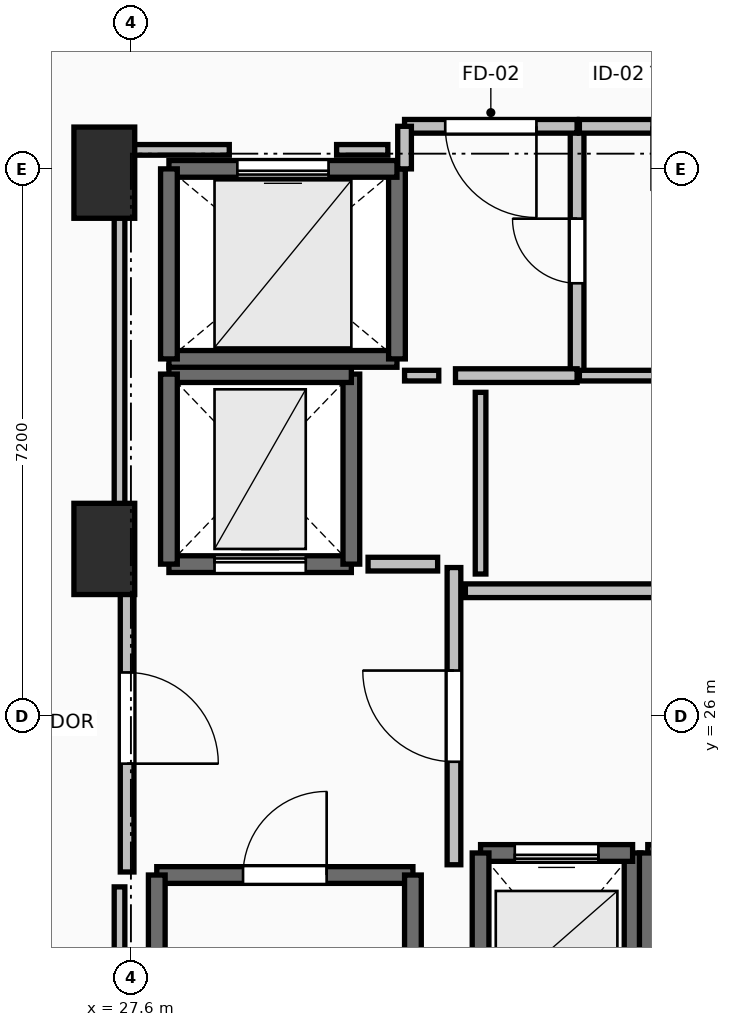
"""IFC4 building model, lengths in metres.
Left out: names, types, materials, properties, quantities, classifications, styles, units other than length and angle.
Written with IfcOpenShell. Run it as: python <this file> out.ifc"""

import sys

from ifc_helpers import new_model, si_unit, direction, frame, frame_2d, origin, origin_2d, place, context, subcontext, project, spatial, rectangle, extrude, element, fill, save


model = new_model("IFC4")
c1 = context("Model", 3, precision=1e-05, world=origin(), true_north=direction((0.0, 1.0)))
c2 = subcontext(c1, "Body", "Model", "MODEL_VIEW")
j1 = project(units=[si_unit("LENGTHUNIT", "METRE"), si_unit("PLANEANGLEUNIT", "RADIAN")], contexts=[c1])
p1 = place(None, origin())
s1 = spatial("IfcSite", under=j1, at=p1, CompositionType="ELEMENT")
p2 = place(p1, origin())
s2 = spatial("IfcBuilding", under=s1, at=p2, CompositionType="ELEMENT")
p3 = place(p2, frame((0.0, 0.0, 136.1)))
s3 = spatial("IfcBuildingStorey", under=s2, at=p3, CompositionType="ELEMENT", Elevation=136.1)
for number, where, z_axis, x_axis in (
    (1, (27.25, 28.2, 0.0), (0.0, 0.0, 1.0), (1.0, 0.0, 0.0)),
    (2, (27.25, 33.15, 0.0), (0.0, 0.0, 1.0), (1.0, 0.0, 0.0)),
):
    element("IfcColumn", number, at=place(p3, frame(where, z_axis=z_axis, x_axis=x_axis)), inside=s3, PredefinedType="PILASTER", context=c2, shape_type="SweptSolid", body=[
        extrude(rectangle(XDim=0.8, YDim=1.2, at=origin_2d()), origin(), (0.0, 0.0, 1.0), 3.5),
    ])
p4 = place(p3, frame((27.94, 23.91, 0.0), z_axis=(0.0, 0.0, 1.0), x_axis=(1.0, 0.0, 0.0)))
e3 = element("IfcWall", 3, at=p4, inside=s3, PredefinedType="SOLIDWALL", context=c2, shape_type="SweptSolid", body=[
    extrude(rectangle(XDim=3.37, YDim=0.22, at=frame_2d((1.685, 0.0))), origin(), (0.0, 0.0, 1.0), 3.24),
])
p5 = place(p4, frame((1.135, 0.0, 0.0)))
e4 = element("IfcOpeningElement", 4, at=p5, cuts=e3, PredefinedType="OPENING", context=c2, shape_type="SweptSolid", body=[
    extrude(rectangle(XDim=1.1, YDim=2.15, at=frame_2d((0.55, 1.075))), frame((0.0, 0.125, 0.0), z_axis=(0.0, -1.0, 0.0), x_axis=(1.0, 0.0, 0.0)), (0.0, 0.0, 1.0), 0.25),
])
for number, where, z_axis, x_axis in (
    (5, (31.31, 23.91, 0.0), (0.0, 0.0, 1.0), (0.0, -1.0, 0.0)),
    (6, (27.94, 16.49, 0.0), (0.0, 0.0, 1.0), (0.0, 1.0, 0.0)),
):
    element("IfcWall", number, at=place(p3, frame(where, z_axis=z_axis, x_axis=x_axis)), inside=s3, PredefinedType="SOLIDWALL", context=c2, shape_type="SweptSolid", body=[
        extrude(rectangle(XDim=7.42, YDim=0.22, at=frame_2d((3.71, 0.0))), origin(), (0.0, 0.0, 1.0), 3.24),
    ])
p6 = place(p3, frame((34.2, 21.8, 0.0), z_axis=(0.0, 0.0, 1.0), x_axis=(0.0, 1.0, 0.0)))
e7 = element("IfcWall", 7, at=p6, inside=s3, PredefinedType="SOLIDWALL", context=c2, shape_type="SweptSolid", body=[
    extrude(rectangle(XDim=2.4, YDim=0.22, at=frame_2d((1.2, 0.0))), origin(), (0.0, 0.0, 1.0), 3.24),
])
p7 = place(p3, frame((34.2, 24.2, 0.0), z_axis=(0.0, 0.0, 1.0), x_axis=(-1.0, 0.0, 0.0)))
e8 = element("IfcWall", 8, at=p7, inside=s3, PredefinedType="SOLIDWALL", context=c2, shape_type="SweptSolid", body=[
    extrude(rectangle(XDim=2.0, YDim=0.22, at=frame_2d((1.0, 0.0))), origin(), (0.0, 0.0, 1.0), 3.24),
])
p8 = place(p7, frame((0.45, 0.0, 0.0)))
e9 = element("IfcOpeningElement", 9, at=p8, cuts=e8, PredefinedType="OPENING", context=c2, shape_type="SweptSolid", body=[
    extrude(rectangle(XDim=1.1, YDim=2.2, at=frame_2d((0.55, 1.1))), frame((0.0, 0.125, 0.0), z_axis=(0.0, -1.0, 0.0), x_axis=(1.0, 0.0, 0.0)), (0.0, 0.0, 1.0), 0.25),
])
p9 = place(p3, frame((32.2, 24.2, 0.0), z_axis=(0.0, 0.0, 1.0), x_axis=(0.0, -1.0, 0.0)))
e10 = element("IfcWall", 10, at=p9, inside=s3, PredefinedType="SOLIDWALL", context=c2, shape_type="SweptSolid", body=[
    extrude(rectangle(XDim=2.4, YDim=0.22, at=frame_2d((1.2, 0.0))), origin(), (0.0, 0.0, 1.0), 3.24),
])
p10 = place(p3, frame((36.4, 24.2, 0.0), z_axis=(0.0, 0.0, 1.0), x_axis=(-1.0, 0.0, 0.0)))
e11 = element("IfcWall", 11, at=p10, inside=s3, PredefinedType="SOLIDWALL", context=c2, shape_type="SweptSolid", body=[
    extrude(rectangle(XDim=2.0, YDim=0.22, at=frame_2d((1.0, 0.0))), origin(), (0.0, 0.0, 1.0), 3.24),
])
p11 = place(p10, frame((0.45, 0.0, 0.0)))
e12 = element("IfcOpeningElement", 12, at=p11, cuts=e11, PredefinedType="OPENING", context=c2, shape_type="SweptSolid", body=[
    extrude(rectangle(XDim=1.1, YDim=2.2, at=frame_2d((0.55, 1.1))), frame((0.0, 0.125, 0.0), z_axis=(0.0, -1.0, 0.0), x_axis=(1.0, 0.0, 0.0)), (0.0, 0.0, 1.0), 0.25),
])
p12 = place(p3, frame((34.4, 24.2, 0.0), z_axis=(0.0, 0.0, 1.0), x_axis=(0.0, -1.0, 0.0)))
e13 = element("IfcWall", 13, at=p12, inside=s3, PredefinedType="SOLIDWALL", context=c2, shape_type="SweptSolid", body=[
    extrude(rectangle(XDim=2.4, YDim=0.22, at=frame_2d((1.2, 0.0))), origin(), (0.0, 0.0, 1.0), 3.24),
])
p13 = place(p3, frame((28.1, 28.0, 0.0), z_axis=(0.0, 0.0, 1.0), x_axis=(1.0, 0.0, 0.0)))
e14 = element("IfcWall", 14, at=p13, inside=s3, PredefinedType="SHEAR", context=c2, shape_type="SweptSolid", body=[
    extrude(rectangle(XDim=2.4, YDim=0.22, at=frame_2d((1.2, 0.0))), origin(), (0.0, 0.0, 1.0), 3.24),
])
p14 = place(p13, frame((0.6, 0.0, 0.0)))
e15 = element("IfcOpeningElement", 15, at=p14, cuts=e14, PredefinedType="OPENING", context=c2, shape_type="SweptSolid", body=[
    extrude(rectangle(XDim=1.2, YDim=2.2, at=frame_2d((0.6, 1.1))), frame((0.0, 0.125, 0.0), z_axis=(0.0, -1.0, 0.0), x_axis=(1.0, 0.0, 0.0)), (0.0, 0.0, 1.0), 0.25),
])
p15 = place(p3, frame((30.5, 28.0, 0.0), z_axis=(0.0, 0.0, 1.0), x_axis=(0.0, 1.0, 0.0)))
e16 = element("IfcWall", 16, at=p15, inside=s3, PredefinedType="SHEAR", context=c2, shape_type="SweptSolid", body=[
    extrude(rectangle(XDim=2.5, YDim=0.22, at=frame_2d((1.25, 0.0))), origin(), (0.0, 0.0, 1.0), 3.24),
])
p16 = place(p3, frame((30.5, 30.5, 0.0), z_axis=(0.0, 0.0, 1.0), x_axis=(-1.0, 0.0, 0.0)))
e17 = element("IfcWall", 17, at=p16, inside=s3, PredefinedType="SHEAR", context=c2, shape_type="SweptSolid", body=[
    extrude(rectangle(XDim=2.4, YDim=0.22, at=frame_2d((1.2, 0.0))), origin(), (0.0, 0.0, 1.0), 3.24),
])
p17 = place(p3, frame((28.1, 30.5, 0.0), z_axis=(0.0, 0.0, 1.0), x_axis=(0.0, -1.0, 0.0)))
e18 = element("IfcWall", 18, at=p17, inside=s3, PredefinedType="SHEAR", context=c2, shape_type="SweptSolid", body=[
    extrude(rectangle(XDim=2.5, YDim=0.22, at=frame_2d((1.25, 0.0))), origin(), (0.0, 0.0, 1.0), 3.24),
])
p18 = place(p3, frame((28.1, 30.7, 0.0), z_axis=(0.0, 0.0, 1.0), x_axis=(1.0, 0.0, 0.0)))
e19 = element("IfcWall", 19, at=p18, inside=s3, PredefinedType="SOLIDWALL", context=c2, shape_type="SweptSolid", body=[
    extrude(rectangle(XDim=3.0, YDim=0.22, at=frame_2d((1.5, 0.0))), origin(), (0.0, 0.0, 1.0), 3.24),
])
p19 = place(p3, frame((31.1, 30.7, 0.0), z_axis=(0.0, 0.0, 1.0), x_axis=(0.0, 1.0, 0.0)))
e20 = element("IfcWall", 20, at=p19, inside=s3, PredefinedType="SOLIDWALL", context=c2, shape_type="SweptSolid", body=[
    extrude(rectangle(XDim=2.5, YDim=0.22, at=frame_2d((1.25, 0.0))), origin(), (0.0, 0.0, 1.0), 3.24),
])
p20 = place(p3, frame((31.1, 33.2, 0.0), z_axis=(0.0, 0.0, 1.0), x_axis=(-1.0, 0.0, 0.0)))
e21 = element("IfcWall", 21, at=p20, inside=s3, PredefinedType="SOLIDWALL", context=c2, shape_type="SweptSolid", body=[
    extrude(rectangle(XDim=3.0, YDim=0.22, at=frame_2d((1.5, 0.0))), origin(), (0.0, 0.0, 1.0), 3.24),
])
p21 = place(p20, frame((0.9, 0.0, 0.0)))
e22 = element("IfcOpeningElement", 22, at=p21, cuts=e21, PredefinedType="OPENING", context=c2, shape_type="SweptSolid", body=[
    extrude(rectangle(XDim=1.2, YDim=2.2, at=frame_2d((0.6, 1.1))), frame((0.0, 0.125, 0.0), z_axis=(0.0, -1.0, 0.0), x_axis=(1.0, 0.0, 0.0)), (0.0, 0.0, 1.0), 0.25),
])
p22 = place(p3, frame((28.1, 33.2, 0.0), z_axis=(0.0, 0.0, 1.0), x_axis=(0.0, -1.0, 0.0)))
e23 = element("IfcWall", 23, at=p22, inside=s3, PredefinedType="SOLIDWALL", context=c2, shape_type="SweptSolid", body=[
    extrude(rectangle(XDim=2.5, YDim=0.22, at=frame_2d((1.25, 0.0))), origin(), (0.0, 0.0, 1.0), 3.24),
])
p23 = place(p3, frame((31.85, 24.045, 0.0), z_axis=(0.0, 0.0, 1.0), x_axis=(0.0, 1.0, 0.0)))
e24 = element("IfcWall", 24, at=p23, inside=s3, PredefinedType="PARTITIONING", context=c2, shape_type="SweptSolid", body=[
    extrude(rectangle(XDim=3.91, YDim=0.18, at=frame_2d((1.955, 0.0))), origin(), (0.0, 0.0, 1.0), 3.24),
])
p24 = place(p23, frame((1.355, 0.0, 0.0)))
e25 = element("IfcOpeningElement", 25, at=p24, cuts=e24, PredefinedType="OPENING", context=c2, shape_type="SweptSolid", body=[
    extrude(rectangle(XDim=1.2, YDim=2.15, at=frame_2d((0.6, 1.075))), frame((0.0, 0.105, 0.0), z_axis=(0.0, -1.0, 0.0), x_axis=(1.0, 0.0, 0.0)), (0.0, 0.0, 1.0), 0.21),
])
p25 = place(p3, frame((27.55, 28.0, 0.0), z_axis=(0.0, 0.0, 1.0), x_axis=(0.0, -1.0, 0.0)))
e26 = element("IfcWall", 26, at=p25, inside=s3, PredefinedType="PARTITIONING", context=c2, shape_type="SweptSolid", body=[
    extrude(rectangle(XDim=4.05, YDim=0.18, at=frame_2d((2.025, 0.0))), origin(), (0.0, 0.0, 1.0), 3.24),
])
p26 = place(p25, frame((1.425, 0.0, 0.0)))
e27 = element("IfcOpeningElement", 27, at=p26, cuts=e26, PredefinedType="OPENING", context=c2, shape_type="SweptSolid", body=[
    extrude(rectangle(XDim=1.2, YDim=2.15, at=frame_2d((0.6, 1.075))), frame((0.0, 0.105, 0.0), z_axis=(0.0, -1.0, 0.0), x_axis=(1.0, 0.0, 0.0)), (0.0, 0.0, 1.0), 0.21),
])
p27 = place(p3, frame((33.47, 30.48, 0.0), z_axis=(0.0, 0.0, 1.0), x_axis=(0.0, 1.0, 0.0)))
e28 = element("IfcWall", 28, at=p27, inside=s3, PredefinedType="PARTITIONING", context=c2, shape_type="SweptSolid", body=[
    extrude(rectangle(XDim=3.28, YDim=0.18, at=frame_2d((1.64, 0.0))), origin(), (0.0, 0.0, 1.0), 3.24),
])
p28 = place(p27, frame((1.215, 0.0, 0.0)))
e29 = element("IfcOpeningElement", 29, at=p28, cuts=e28, PredefinedType="OPENING", context=c2, shape_type="SweptSolid", body=[
    extrude(rectangle(XDim=0.85, YDim=2.1, at=frame_2d((0.425, 1.05))), frame((0.0, 0.105, 0.0), z_axis=(0.0, -1.0, 0.0), x_axis=(1.0, 0.0, 0.0)), (0.0, 0.0, 1.0), 0.21),
])
p29 = place(p3, frame((31.87, 30.48, 0.0), z_axis=(0.0, 0.0, 1.0), x_axis=(1.0, 0.0, 0.0)))
e30 = element("IfcWall", 30, at=p29, inside=s3, PredefinedType="PARTITIONING", context=c2, shape_type="SweptSolid", body=[
    extrude(rectangle(XDim=1.6, YDim=0.18, at=frame_2d((0.8, 0.0))), origin(), (0.0, 0.0, 1.0), 3.24),
])
p30 = place(p3, frame((33.47, 33.76, 0.0), z_axis=(0.0, 0.0, 1.0), x_axis=(-1.0, 0.0, 0.0)))
e31 = element("IfcWall", 31, at=p30, inside=s3, PredefinedType="PARTITIONING", context=c2, shape_type="SweptSolid", body=[
    extrude(rectangle(XDim=2.27, YDim=0.18, at=frame_2d((1.135, 0.0))), origin(), (0.0, 0.0, 1.0), 3.24),
])
p31 = place(p30, frame((0.535, 0.0, 0.0)))
e32 = element("IfcOpeningElement", 32, at=p31, cuts=e31, PredefinedType="OPENING", context=c2, shape_type="SweptSolid", body=[
    extrude(rectangle(XDim=1.2, YDim=2.15, at=frame_2d((0.6, 1.075))), frame((0.0, 0.105, 0.0), z_axis=(0.0, -1.0, 0.0), x_axis=(1.0, 0.0, 0.0)), (0.0, 0.0, 1.0), 0.21),
])
p32 = place(p3, frame((31.2, 33.76, 0.0), z_axis=(0.0, 0.0, 1.0), x_axis=(0.0, -1.0, 0.0)))
e33 = element("IfcWall", 33, at=p32, inside=s3, PredefinedType="PARTITIONING", context=c2, shape_type="SweptSolid", body=[
    extrude(rectangle(XDim=0.56, YDim=0.18, at=frame_2d((0.28, 0.0))), origin(), (0.0, 0.0, 1.0), 3.24),
])
p33 = place(p3, frame((39.19, 27.65, 0.0), z_axis=(0.0, 0.0, 1.0), x_axis=(-1.0, 0.0, 0.0)))
e34 = element("IfcWall", 34, at=p33, inside=s3, PredefinedType="PARTITIONING", context=c2, shape_type="SweptSolid", body=[
    extrude(rectangle(XDim=7.19, YDim=0.18, at=frame_2d((3.595, 0.0))), origin(), (0.0, 0.0, 1.0), 3.24),
])
p34 = place(p33, frame((3.095, 0.0, 0.0)))
e35 = element("IfcOpeningElement", 35, at=p34, cuts=e34, PredefinedType="OPENING", context=c2, shape_type="SweptSolid", body=[
    extrude(rectangle(XDim=1.0, YDim=2.15, at=frame_2d((0.5, 1.075))), frame((0.0, 0.105, 0.0), z_axis=(0.0, -1.0, 0.0), x_axis=(1.0, 0.0, 0.0)), (0.0, 0.0, 1.0), 0.21),
])
p35 = place(p3, frame((33.5, 30.48, 0.0), z_axis=(0.0, 0.0, 1.0), x_axis=(1.0, 0.0, 0.0)))
e36 = element("IfcWall", 36, at=p35, inside=s3, PredefinedType="PARTITIONING", context=c2, shape_type="SweptSolid", body=[
    extrude(rectangle(XDim=2.75, YDim=0.14, at=frame_2d((1.375, 0.0))), origin(), (0.0, 0.0, 1.0), 2.432),
])
p36 = place(p3, frame((36.25, 33.76, 0.0), z_axis=(0.0, 0.0, 1.0), x_axis=(-1.0, 0.0, 0.0)))
e37 = element("IfcWall", 37, at=p36, inside=s3, PredefinedType="PARTITIONING", context=c2, shape_type="SweptSolid", body=[
    extrude(rectangle(XDim=2.75, YDim=0.18, at=frame_2d((1.375, 0.0))), origin(), (0.0, 0.0, 1.0), 3.24),
])
p37 = place(p36, frame((0.95, 0.0, 0.0)))
e38 = element("IfcOpeningElement", 38, at=p37, cuts=e37, PredefinedType="OPENING", context=c2, shape_type="SweptSolid", body=[
    extrude(rectangle(XDim=0.85, YDim=2.1, at=frame_2d((0.425, 1.05))), frame((0.0, 0.105, 0.0), z_axis=(0.0, -1.0, 0.0), x_axis=(1.0, 0.0, 0.0)), (0.0, 0.0, 1.0), 0.21),
])
p38 = place(p3, frame((31.635, 28.0, 0.0), z_axis=(0.0, 0.0, 1.0), x_axis=(-1.0, 0.0, 0.0)))
e39 = element("IfcWall", 39, at=p38, inside=s3, PredefinedType="PARTITIONING", context=c2, shape_type="SweptSolid", body=[
    extrude(rectangle(XDim=0.915, YDim=0.18, at=frame_2d((0.458, 0.0))), origin(), (0.0, 0.0, 1.0), 3.24),
])
p39 = place(p3, frame((31.2, 30.48, 0.0), z_axis=(0.0, 0.0, 1.0), x_axis=(1.0, 0.0, 0.0)))
e40 = element("IfcWall", 40, at=p39, inside=s3, PredefinedType="PARTITIONING", context=c2, shape_type="SweptSolid", body=[
    extrude(rectangle(XDim=0.45, YDim=0.14, at=frame_2d((0.225, 0.0))), origin(), (0.0, 0.0, 1.0), 3.24),
])
p40 = place(p3, frame((32.2, 30.26, 0.0), z_axis=(0.0, 0.0, 1.0), x_axis=(0.0, -1.0, 0.0)))
e41 = element("IfcWall", 41, at=p40, inside=s3, PredefinedType="PARTITIONING", context=c2, shape_type="SweptSolid", body=[
    extrude(rectangle(XDim=2.39, YDim=0.14, at=frame_2d((1.195, 0.0))), origin(), (0.0, 0.0, 1.0), 3.24),
])
p41 = place(p3, frame((30.98, 33.45, 0.0), z_axis=(0.0, 0.0, 1.0), x_axis=(-1.0, 0.0, 0.0)))
e42 = element("IfcWall", 42, at=p41, inside=s3, PredefinedType="PARTITIONING", context=c2, shape_type="SweptSolid", body=[
    extrude(rectangle(XDim=0.674, YDim=0.14, at=frame_2d((0.337, 0.0))), origin(), (0.0, 0.0, 1.0), 3.24),
])
p42 = place(p3, frame((28.894, 33.45, 0.0), z_axis=(0.0, 0.0, 1.0), x_axis=(-1.0, 0.0, 0.0)))
e43 = element("IfcWall", 43, at=p42, inside=s3, PredefinedType="PARTITIONING", context=c2, shape_type="SweptSolid", body=[
    extrude(rectangle(XDim=1.444, YDim=0.14, at=frame_2d((0.722, 0.0))), origin(), (0.0, 0.0, 1.0), 2.432),
])
p43 = place(p3, frame((27.45, 33.45, 0.0), z_axis=(0.0, 0.0, 1.0), x_axis=(0.0, -1.0, 0.0)))
e44 = element("IfcWall", 44, at=p43, inside=s3, PredefinedType="PARTITIONING", context=c2, shape_type="SweptSolid", body=[
    extrude(rectangle(XDim=5.254, YDim=0.14, at=frame_2d((2.627, 0.0))), origin(), (0.0, 0.0, 1.0), 2.432),
])
p44 = place(p3, frame((27.45, 23.754, 0.0), z_axis=(0.0, 0.0, 1.0), x_axis=(0.0, -1.0, 0.0)))
e45 = element("IfcWall", 45, at=p44, inside=s3, PredefinedType="PARTITIONING", context=c2, shape_type="SweptSolid", body=[
    extrude(rectangle(XDim=7.514, YDim=0.14, at=frame_2d((3.757, 0.0))), origin(), (0.0, 0.0, 1.0), 2.432),
])
p45 = place(p5, origin())
e46 = element("IfcDoor", 46, at=p45, inside=s3, OperationType="SINGLE_SWING_RIGHT", PredefinedType="DOOR", context=c2, shape_type="SweptSolid", body=[
    extrude(rectangle(XDim=1.1, YDim=2.15, at=frame_2d((0.55, 1.075))), frame((0.0, 0.025, 0.0), z_axis=(0.0, -1.0, 0.0), x_axis=(1.0, 0.0, 0.0)), (0.0, 0.0, 1.0), 0.05),
])
fill(e4, e46)
p46 = place(p8, origin())
e47 = element("IfcDoor", 47, at=p46, inside=s3, OperationType="SLIDING_TO_LEFT", PredefinedType="DOOR", context=c2, shape_type="SweptSolid", body=[
    extrude(rectangle(XDim=1.1, YDim=2.2, at=frame_2d((0.55, 1.1))), frame((0.0, 0.025, 0.0), z_axis=(0.0, -1.0, 0.0), x_axis=(1.0, 0.0, 0.0)), (0.0, 0.0, 1.0), 0.05),
])
fill(e9, e47)
p47 = place(p14, origin())
e48 = element("IfcDoor", 48, at=p47, inside=s3, OperationType="SLIDING_TO_LEFT", PredefinedType="DOOR", context=c2, shape_type="SweptSolid", body=[
    extrude(rectangle(XDim=1.2, YDim=2.2, at=frame_2d((0.6, 1.1))), frame((0.0, 0.025, 0.0), z_axis=(0.0, -1.0, 0.0), x_axis=(1.0, 0.0, 0.0)), (0.0, 0.0, 1.0), 0.05),
])
fill(e15, e48)
p48 = place(p21, origin())
e49 = element("IfcDoor", 49, at=p48, inside=s3, OperationType="SLIDING_TO_LEFT", PredefinedType="DOOR", context=c2, shape_type="SweptSolid", body=[
    extrude(rectangle(XDim=1.2, YDim=2.2, at=frame_2d((0.6, 1.1))), frame((0.0, 0.025, 0.0), z_axis=(0.0, -1.0, 0.0), x_axis=(1.0, 0.0, 0.0)), (0.0, 0.0, 1.0), 0.05),
])
fill(e22, e49)
p49 = place(p24, origin())
e50 = element("IfcDoor", 50, at=p49, inside=s3, OperationType="SINGLE_SWING_RIGHT", PredefinedType="DOOR", context=c2, shape_type="SweptSolid", body=[
    extrude(rectangle(XDim=1.2, YDim=2.15, at=frame_2d((0.6, 1.075))), frame((0.0, 0.025, 0.0), z_axis=(0.0, -1.0, 0.0), x_axis=(1.0, 0.0, 0.0)), (0.0, 0.0, 1.0), 0.05),
])
fill(e25, e50)
p50 = place(p26, origin())
e51 = element("IfcDoor", 51, at=p50, inside=s3, OperationType="SINGLE_SWING_RIGHT", PredefinedType="DOOR", context=c2, shape_type="SweptSolid", body=[
    extrude(rectangle(XDim=1.2, YDim=2.15, at=frame_2d((0.6, 1.075))), frame((0.0, 0.025, 0.0), z_axis=(0.0, -1.0, 0.0), x_axis=(1.0, 0.0, 0.0)), (0.0, 0.0, 1.0), 0.05),
])
fill(e27, e51)
p51 = place(p28, origin())
e52 = element("IfcDoor", 52, at=p51, inside=s3, OperationType="SINGLE_SWING_RIGHT", PredefinedType="DOOR", context=c2, shape_type="SweptSolid", body=[
    extrude(rectangle(XDim=0.85, YDim=2.1, at=frame_2d((0.425, 1.05))), frame((0.0, 0.025, 0.0), z_axis=(0.0, -1.0, 0.0), x_axis=(1.0, 0.0, 0.0)), (0.0, 0.0, 1.0), 0.05),
])
fill(e29, e52)
p52 = place(p31, origin())
e53 = element("IfcDoor", 53, at=p52, inside=s3, OperationType="SINGLE_SWING_LEFT", PredefinedType="DOOR", context=c2, shape_type="SweptSolid", body=[
    extrude(rectangle(XDim=1.2, YDim=2.15, at=frame_2d((0.6, 1.075))), frame((0.0, 0.025, 0.0), z_axis=(0.0, -1.0, 0.0), x_axis=(1.0, 0.0, 0.0)), (0.0, 0.0, 1.0), 0.05),
])
fill(e32, e53)
save(model, sys.argv[1])
